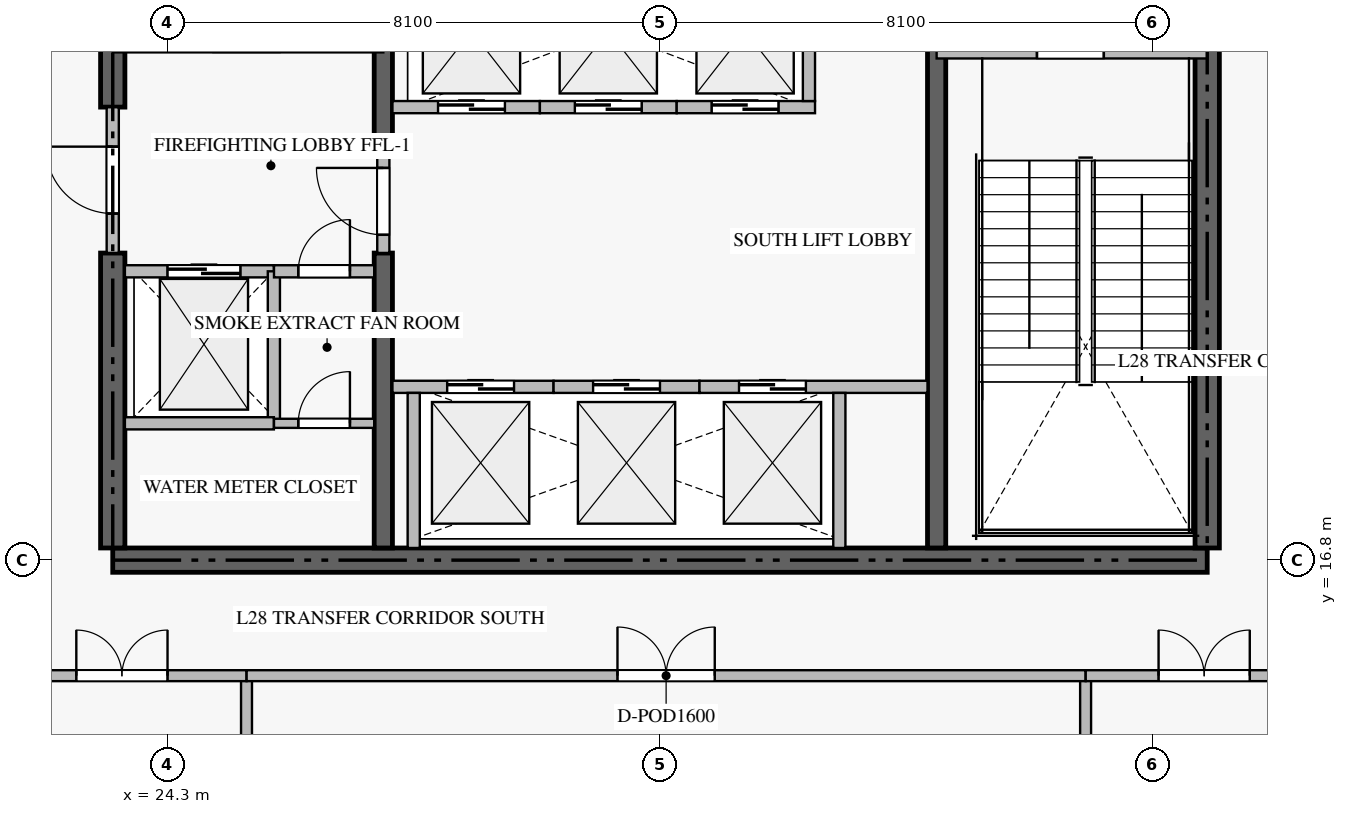
"""IFC4 building model, lengths in metres.
Left out: names, types, materials, properties, quantities, classifications, styles, units other than length and angle.
Written with IfcOpenShell. Run it as: python <this file> out.ifc"""

import sys

from ifc_helpers import new_model, si_unit, direction, frame, frame_2d, origin, place, context, subcontext, project, spatial, rectangle, extrude, source, transform, mapped, element, fill, save


model = new_model("IFC4")
c1 = context("Model", 3, precision=1e-05, world=origin(), true_north=direction((0.0, 1.0)))
c2 = subcontext(c1, "Body", "Model", "MODEL_VIEW")
j1 = project(units=[si_unit("LENGTHUNIT", "METRE"), si_unit("PLANEANGLEUNIT", "RADIAN")], contexts=[c1])
p1 = place(None, origin())
s1 = spatial("IfcSite", under=j1, at=p1, CompositionType="ELEMENT")
p2 = place(p1, origin())
s2 = spatial("IfcBuilding", under=s1, at=p2, CompositionType="ELEMENT")
p3 = place(p2, frame((0.0, 0.0, 115.2)))
s3 = spatial("IfcBuildingStorey", under=s2, at=p3, CompositionType="ELEMENT", Elevation=115.2)
p4 = place(p3, frame((23.4, 16.8, -0.36), z_axis=(0.0, 0.0, 1.0), x_axis=(1.0, 0.0, 0.0)))
e1 = element("IfcWall", 1, at=p4, inside=s3, PredefinedType="SHEAR", context=c2, shape_type="SweptSolid", body=[
    extrude(rectangle(XDim=18.0, YDim=0.4, at=frame_2d((9.0, 0.0))), origin(), (0.0, 0.0, 1.0), 4.868),
])
p5 = place(p3, frame((23.4, 17.0, -0.36), z_axis=(0.0, 0.0, 1.0), x_axis=(0.0, 1.0, 0.0)))
e2 = element("IfcWall", 2, at=p5, inside=s3, PredefinedType="SHEAR", context=c2, shape_type="SweptSolid", body=[
    extrude(rectangle(XDim=4.85, YDim=0.4, at=frame_2d((2.425, 0.0))), origin(), (0.0, 0.0, 1.0), 4.868),
])
p6 = place(p3, frame((23.4, 24.25, -0.36), z_axis=(0.0, 0.0, 1.0), x_axis=(0.0, 1.0, 0.0)))
e3 = element("IfcWall", 3, at=p6, inside=s3, PredefinedType="SHEAR", context=c2, shape_type="SweptSolid", body=[
    extrude(rectangle(XDim=9.15, YDim=0.4, at=frame_2d((4.575, 0.0))), origin(), (0.0, 0.0, 1.0), 4.868),
])
p7 = place(p3, frame((41.4, 17.0, -0.36), z_axis=(0.0, 0.0, 1.0), x_axis=(0.0, 1.0, 0.0)))
e4 = element("IfcWall", 4, at=p7, inside=s3, PredefinedType="SHEAR", context=c2, shape_type="SweptSolid", body=[
    extrude(rectangle(XDim=8.35, YDim=0.4, at=frame_2d((4.175, 0.0))), origin(), (0.0, 0.0, 1.0), 4.868),
])
p8 = place(p3, frame((27.85, 17.0, -0.36), z_axis=(0.0, 0.0, 1.0), x_axis=(0.0, 1.0, 0.0)))
e5 = element("IfcWall", 5, at=p8, inside=s3, PredefinedType="SHEAR", context=c2, shape_type="SweptSolid", body=[
    extrude(rectangle(XDim=4.85, YDim=0.3, at=frame_2d((2.425, 0.0))), origin(), (0.0, 0.0, 1.0), 4.868),
])
p9 = place(p3, frame((27.85, 23.55, -0.36), z_axis=(0.0, 0.0, 1.0), x_axis=(0.0, 1.0, 0.0)))
e6 = element("IfcWall", 6, at=p9, inside=s3, PredefinedType="SHEAR", context=c2, shape_type="SweptSolid", body=[
    extrude(rectangle(XDim=9.85, YDim=0.3, at=frame_2d((4.925, 0.0))), origin(), (0.0, 0.0, 1.0), 4.868),
])
p10 = place(p3, frame((36.95, 17.0, -0.36), z_axis=(0.0, 0.0, 1.0), x_axis=(0.0, 1.0, 0.0)))
e7 = element("IfcWall", 7, at=p10, inside=s3, PredefinedType="SHEAR", context=c2, shape_type="SweptSolid", body=[
    extrude(rectangle(XDim=8.35, YDim=0.3, at=frame_2d((4.175, 0.0))), origin(), (0.0, 0.0, 1.0), 4.868),
])
p11 = place(p3, frame((36.95, 25.15, 0.0), z_axis=(0.0, 0.0, 1.0), x_axis=(1.0, 0.0, 0.0)))
e8 = element("IfcWall", 8, at=p11, inside=s3, PredefinedType="STANDARD", context=c2, shape_type="SweptSolid", body=[
    extrude(rectangle(XDim=4.45, YDim=0.2, at=frame_2d((2.225, 0.0))), origin(), (0.0, 0.0, 1.0), 4.51),
])
p12 = place(p11, frame((1.65, 0.0, 0.0)))
e9 = element("IfcOpeningElement", 9, at=p12, cuts=e8, PredefinedType="OPENING", context=c2, shape_type="SweptSolid", body=[
    extrude(rectangle(XDim=1.1, YDim=2.15, at=frame_2d((0.55, 1.075))), frame((0.0, 0.11, 0.0), z_axis=(0.0, -1.0, 0.0), x_axis=(1.0, 0.0, 0.0)), (0.0, 0.0, 1.0), 0.22),
])
p13 = place(p3, frame((23.6, 21.55, 0.0), z_axis=(0.0, 0.0, 1.0), x_axis=(1.0, 0.0, 0.0)))
e10 = element("IfcWall", 10, at=p13, inside=s3, PredefinedType="STANDARD", context=c2, shape_type="SweptSolid", body=[
    extrude(rectangle(XDim=2.45, YDim=0.2, at=frame_2d((1.225, 0.0))), origin(), (0.0, 0.0, 1.0), 4.51),
])
p14 = place(p13, frame((0.7, 0.0, 0.0)))
e11 = element("IfcOpeningElement", 11, at=p14, cuts=e10, PredefinedType="OPENING", context=c2, shape_type="SweptSolid", body=[
    extrude(rectangle(XDim=1.2, YDim=2.2, at=frame_2d((0.6, 1.1))), frame((0.0, 0.11, 0.0), z_axis=(0.0, -1.0, 0.0), x_axis=(1.0, 0.0, 0.0)), (0.0, 0.0, 1.0), 0.22),
])
p15 = place(p3, frame((28.0, 19.65, 0.0), z_axis=(0.0, 0.0, 1.0), x_axis=(1.0, 0.0, 0.0)))
e12 = element("IfcWall", 12, at=p15, inside=s3, PredefinedType="STANDARD", context=c2, shape_type="SweptSolid", body=[
    extrude(rectangle(XDim=2.65, YDim=0.2, at=frame_2d((1.325, 0.0))), origin(), (0.0, 0.0, 1.0), 4.51),
])
p16 = place(p15, frame((0.9, 0.0, 0.0)))
e13 = element("IfcOpeningElement", 13, at=p16, cuts=e12, PredefinedType="OPENING", context=c2, shape_type="SweptSolid", body=[
    extrude(rectangle(XDim=1.1, YDim=2.2, at=frame_2d((0.55, 1.1))), frame((0.0, 0.11, 0.0), z_axis=(0.0, -1.0, 0.0), x_axis=(1.0, 0.0, 0.0)), (0.0, 0.0, 1.0), 0.22),
])
p17 = place(p3, frame((28.35, 17.0, 0.0), z_axis=(0.0, 0.0, 1.0), x_axis=(0.0, 1.0, 0.0)))
e14 = element("IfcWall", 14, at=p17, inside=s3, PredefinedType="STANDARD", context=c2, shape_type="SweptSolid", body=[
    extrude(rectangle(XDim=2.55, YDim=0.2, at=frame_2d((1.275, 0.0))), origin(), (0.0, 0.0, 1.0), 4.51),
])
p18 = place(p3, frame((30.65, 19.65, 0.0), z_axis=(0.0, 0.0, 1.0), x_axis=(1.0, 0.0, 0.0)))
e15 = element("IfcWall", 15, at=p18, inside=s3, PredefinedType="STANDARD", context=c2, shape_type="SweptSolid", body=[
    extrude(rectangle(XDim=2.4, YDim=0.2, at=frame_2d((1.2, 0.0))), origin(), (0.0, 0.0, 1.0), 4.51),
])
p19 = place(p18, frame((0.65, 0.0, 0.0)))
e16 = element("IfcOpeningElement", 16, at=p19, cuts=e15, PredefinedType="OPENING", context=c2, shape_type="SweptSolid", body=[
    extrude(rectangle(XDim=1.1, YDim=2.2, at=frame_2d((0.55, 1.1))), frame((0.0, 0.11, 0.0), z_axis=(0.0, -1.0, 0.0), x_axis=(1.0, 0.0, 0.0)), (0.0, 0.0, 1.0), 0.22),
])
p20 = place(p3, frame((33.05, 19.65, 0.0), z_axis=(0.0, 0.0, 1.0), x_axis=(1.0, 0.0, 0.0)))
e17 = element("IfcWall", 17, at=p20, inside=s3, PredefinedType="STANDARD", context=c2, shape_type="SweptSolid", body=[
    extrude(rectangle(XDim=3.75, YDim=0.2, at=frame_2d((1.875, 0.0))), origin(), (0.0, 0.0, 1.0), 4.51),
])
p21 = place(p20, frame((0.65, 0.0, 0.0)))
e18 = element("IfcOpeningElement", 18, at=p21, cuts=e17, PredefinedType="OPENING", context=c2, shape_type="SweptSolid", body=[
    extrude(rectangle(XDim=1.1, YDim=2.2, at=frame_2d((0.55, 1.1))), frame((0.0, 0.11, 0.0), z_axis=(0.0, -1.0, 0.0), x_axis=(1.0, 0.0, 0.0)), (0.0, 0.0, 1.0), 0.22),
])
p22 = place(p3, frame((35.35, 17.0, 0.0), z_axis=(0.0, 0.0, 1.0), x_axis=(0.0, 1.0, 0.0)))
e19 = element("IfcWall", 19, at=p22, inside=s3, PredefinedType="STANDARD", context=c2, shape_type="SweptSolid", body=[
    extrude(rectangle(XDim=2.55, YDim=0.2, at=frame_2d((1.275, 0.0))), origin(), (0.0, 0.0, 1.0), 4.51),
])
p23 = place(p3, frame((28.0, 24.25, 0.0), z_axis=(0.0, 0.0, 1.0), x_axis=(1.0, 0.0, 0.0)))
e20 = element("IfcWall", 20, at=p23, inside=s3, PredefinedType="STANDARD", context=c2, shape_type="SweptSolid", body=[
    extrude(rectangle(XDim=2.425, YDim=0.2, at=frame_2d((1.212, 0.0))), origin(), (0.0, 0.0, 1.0), 4.51),
])
p24 = place(p23, frame((0.75, 0.0, 0.0)))
e21 = element("IfcOpeningElement", 21, at=p24, cuts=e20, PredefinedType="OPENING", context=c2, shape_type="SweptSolid", body=[
    extrude(rectangle(XDim=1.1, YDim=2.2, at=frame_2d((0.55, 1.1))), frame((0.0, 0.11, 0.0), z_axis=(0.0, -1.0, 0.0), x_axis=(1.0, 0.0, 0.0)), (0.0, 0.0, 1.0), 0.22),
])
p25 = place(p3, frame((30.425, 24.25, 0.0), z_axis=(0.0, 0.0, 1.0), x_axis=(1.0, 0.0, 0.0)))
e22 = element("IfcWall", 22, at=p25, inside=s3, PredefinedType="STANDARD", context=c2, shape_type="SweptSolid", body=[
    extrude(rectangle(XDim=2.25, YDim=0.2, at=frame_2d((1.125, 0.0))), origin(), (0.0, 0.0, 1.0), 4.51),
])
p26 = place(p25, frame((0.575, 0.0, 0.0)))
e23 = element("IfcOpeningElement", 23, at=p26, cuts=e22, PredefinedType="OPENING", context=c2, shape_type="SweptSolid", body=[
    extrude(rectangle(XDim=1.1, YDim=2.2, at=frame_2d((0.55, 1.1))), frame((0.0, 0.11, 0.0), z_axis=(0.0, -1.0, 0.0), x_axis=(1.0, 0.0, 0.0)), (0.0, 0.0, 1.0), 0.22),
])
p27 = place(p3, frame((32.675, 24.25, 0.0), z_axis=(0.0, 0.0, 1.0), x_axis=(1.0, 0.0, 0.0)))
e24 = element("IfcWall", 24, at=p27, inside=s3, PredefinedType="STANDARD", context=c2, shape_type="SweptSolid", body=[
    extrude(rectangle(XDim=2.275, YDim=0.2, at=frame_2d((1.137, 0.0))), origin(), (0.0, 0.0, 1.0), 4.51),
])
p28 = place(p27, frame((0.575, 0.0, 0.0)))
e25 = element("IfcOpeningElement", 25, at=p28, cuts=e24, PredefinedType="OPENING", context=c2, shape_type="SweptSolid", body=[
    extrude(rectangle(XDim=1.1, YDim=2.2, at=frame_2d((0.55, 1.1))), frame((0.0, 0.11, 0.0), z_axis=(0.0, -1.0, 0.0), x_axis=(1.0, 0.0, 0.0)), (0.0, 0.0, 1.0), 0.22),
])
for number, where, z_axis, x_axis in (
    (26, (34.85, 24.35, 0.0), (0.0, 0.0, 1.0), (0.0, 1.0, 0.0)),
    (27, (26.05, 19.05, 0.0), (0.0, 0.0, 1.0), (0.0, 1.0, 0.0)),
):
    element("IfcWall", number, at=place(p3, frame(where, z_axis=z_axis, x_axis=x_axis)), inside=s3, PredefinedType="STANDARD", context=c2, shape_type="SweptSolid", body=[
        extrude(rectangle(XDim=2.5, YDim=0.2, at=frame_2d((1.25, 0.0))), origin(), (0.0, 0.0, 1.0), 4.51),
    ])
p29 = place(p3, frame((23.6, 19.05, 0.0), z_axis=(0.0, 0.0, 1.0), x_axis=(1.0, 0.0, 0.0)))
e28 = element("IfcWall", 28, at=p29, inside=s3, PredefinedType="STANDARD", context=c2, shape_type="SweptSolid", body=[
    extrude(rectangle(XDim=2.45, YDim=0.2, at=frame_2d((1.225, 0.0))), origin(), (0.0, 0.0, 1.0), 4.51),
])
p30 = place(p3, frame((26.052, 21.55, 0.0), z_axis=(0.0, 0.0, 1.0), x_axis=(1.0, 0.0, 0.0)))
e29 = element("IfcWall", 29, at=p30, inside=s3, PredefinedType="STANDARD", context=c2, shape_type="SweptSolid", body=[
    extrude(rectangle(XDim=1.648, YDim=0.2, at=frame_2d((0.824, 0.0))), origin(), (0.0, 0.0, 1.0), 4.51),
])
p31 = place(p30, frame((0.399, 0.0, 0.0)))
e30 = element("IfcOpeningElement", 30, at=p31, cuts=e29, PredefinedType="OPENING", context=c2, shape_type="SweptSolid", body=[
    extrude(rectangle(XDim=0.85, YDim=2.1, at=frame_2d((0.425, 1.05))), frame((0.0, 0.11, 0.0), z_axis=(0.0, -1.0, 0.0), x_axis=(1.0, 0.0, 0.0)), (0.0, 0.0, 1.0), 0.22),
])
p32 = place(p3, frame((23.4, 21.852, 0.0), z_axis=(0.0, 0.0, 1.0), x_axis=(0.0, 1.0, 0.0)))
e31 = element("IfcWall", 31, at=p32, inside=s3, PredefinedType="STANDARD", context=c2, shape_type="SweptSolid", body=[
    extrude(rectangle(XDim=2.396, YDim=0.2, at=frame_2d((1.198, 0.0))), origin(), (0.0, 0.0, 1.0), 4.51),
])
p33 = place(p32, frame((0.648, 0.0, 0.0)))
e32 = element("IfcOpeningElement", 32, at=p33, cuts=e31, PredefinedType="OPENING", context=c2, shape_type="SweptSolid", body=[
    extrude(rectangle(XDim=1.1, YDim=2.15, at=frame_2d((0.55, 1.075))), frame((0.0, 0.11, 0.0), z_axis=(0.0, -1.0, 0.0), x_axis=(1.0, 0.0, 0.0)), (0.0, 0.0, 1.0), 0.22),
])
p34 = place(p3, frame((27.85, 21.852, 0.0), z_axis=(0.0, 0.0, 1.0), x_axis=(0.0, 1.0, 0.0)))
e33 = element("IfcWall", 33, at=p34, inside=s3, PredefinedType="STANDARD", context=c2, shape_type="SweptSolid", body=[
    extrude(rectangle(XDim=1.696, YDim=0.2, at=frame_2d((0.848, 0.0))), origin(), (0.0, 0.0, 1.0), 4.51),
])
p35 = place(p34, frame((0.298, 0.0, 0.0)))
e34 = element("IfcOpeningElement", 34, at=p35, cuts=e33, PredefinedType="OPENING", context=c2, shape_type="SweptSolid", body=[
    extrude(rectangle(XDim=1.1, YDim=2.15, at=frame_2d((0.55, 1.075))), frame((0.0, 0.11, 0.0), z_axis=(0.0, -1.0, 0.0), x_axis=(1.0, 0.0, 0.0)), (0.0, 0.0, 1.0), 0.22),
])
p36 = place(p3, frame((26.052, 19.05, 0.0), z_axis=(0.0, 0.0, 1.0), x_axis=(1.0, 0.0, 0.0)))
e35 = element("IfcWall", 35, at=p36, inside=s3, PredefinedType="PARTITIONING", context=c2, shape_type="SweptSolid", body=[
    extrude(rectangle(XDim=1.648, YDim=0.15, at=frame_2d((0.824, 0.0))), origin(), (0.0, 0.0, 1.0), 4.51),
])
p37 = place(p36, frame((0.399, 0.0, 0.0)))
e36 = element("IfcOpeningElement", 36, at=p37, cuts=e35, PredefinedType="OPENING", context=c2, shape_type="SweptSolid", body=[
    extrude(rectangle(XDim=0.85, YDim=2.1, at=frame_2d((0.425, 1.05))), frame((0.0, 0.085, 0.0), z_axis=(0.0, -1.0, 0.0), x_axis=(1.0, 0.0, 0.0)), (0.0, 0.0, 1.0), 0.17),
])
for number, where, z_axis, x_axis in (
    (37, (25.6, 0.282, 0.0), (0.0, 0.0, 1.0), (0.0, 1.0, 0.0)),
    (38, (39.4, 0.282, 0.0), (0.0, 0.0, 1.0), (0.0, 1.0, 0.0)),
):
    element("IfcWall", number, at=place(p3, frame(where, z_axis=z_axis, x_axis=x_axis)), inside=s3, PredefinedType="PARTITIONING", context=c2, shape_type="SweptSolid", body=[
        extrude(rectangle(XDim=14.618, YDim=0.18, at=frame_2d((7.309, 0.0))), origin(), (0.0, 0.0, 1.0), 4.51),
    ])
p38 = place(p3, frame((21.502, 14.9, 0.0), z_axis=(0.0, 0.0, 1.0), x_axis=(1.0, 0.0, 0.0)))
e39 = element("IfcWall", 39, at=p38, inside=s3, PredefinedType="PARTITIONING", context=c2, shape_type="SweptSolid", body=[
    extrude(rectangle(XDim=4.098, YDim=0.18, at=frame_2d((2.049, 0.0))), origin(), (0.0, 0.0, 1.0), 4.51),
])
p39 = place(p38, frame((1.299, 0.0, 0.0)))
e40 = element("IfcOpeningElement", 40, at=p39, cuts=e39, PredefinedType="OPENING", context=c2, shape_type="SweptSolid", body=[
    extrude(rectangle(XDim=1.5, YDim=2.25, at=frame_2d((0.75, 1.125))), frame((0.0, 0.1, 0.0), z_axis=(0.0, -1.0, 0.0), x_axis=(1.0, 0.0, 0.0)), (0.0, 0.0, 1.0), 0.2),
])
p40 = place(p3, frame((25.602, 14.9, 0.0), z_axis=(0.0, 0.0, 1.0), x_axis=(1.0, 0.0, 0.0)))
e41 = element("IfcWall", 41, at=p40, inside=s3, PredefinedType="PARTITIONING", context=c2, shape_type="SweptSolid", body=[
    extrude(rectangle(XDim=13.798, YDim=0.18, at=frame_2d((6.899, 0.0))), origin(), (0.0, 0.0, 1.0), 4.51),
])
p41 = place(p40, frame((6.099, 0.0, 0.0)))
e42 = element("IfcOpeningElement", 42, at=p41, cuts=e41, PredefinedType="OPENING", context=c2, shape_type="SweptSolid", body=[
    extrude(rectangle(XDim=1.6, YDim=2.3, at=frame_2d((0.8, 1.15))), frame((0.0, 0.1, 0.0), z_axis=(0.0, -1.0, 0.0), x_axis=(1.0, 0.0, 0.0)), (0.0, 0.0, 1.0), 0.2),
])
p42 = place(p3, frame((39.402, 14.9, 0.0), z_axis=(0.0, 0.0, 1.0), x_axis=(1.0, 0.0, 0.0)))
e43 = element("IfcWall", 43, at=p42, inside=s3, PredefinedType="PARTITIONING", context=c2, shape_type="SweptSolid", body=[
    extrude(rectangle(XDim=3.896, YDim=0.18, at=frame_2d((1.948, 0.0))), origin(), (0.0, 0.0, 1.0), 4.51),
])
p43 = place(p42, frame((1.198, 0.0, 0.0)))
e44 = element("IfcOpeningElement", 44, at=p43, cuts=e43, PredefinedType="OPENING", context=c2, shape_type="SweptSolid", body=[
    extrude(rectangle(XDim=1.5, YDim=2.25, at=frame_2d((0.75, 1.125))), frame((0.0, 0.1, 0.0), z_axis=(0.0, -1.0, 0.0), x_axis=(1.0, 0.0, 0.0)), (0.0, 0.0, 1.0), 0.2),
])
m1 = source(origin(), c2, "Body", "SweptSolid", [
    extrude(rectangle(XDim=1.1, YDim=2.15, at=frame_2d((0.55, 1.075))), frame((0.0, 0.025, 0.0), z_axis=(0.0, -1.0, 0.0), x_axis=(1.0, 0.0, 0.0)), (0.0, 0.0, 1.0), 0.05),
])
p44 = place(p12, origin())
e45 = element("IfcDoor", 45, at=p44, inside=s3, OperationType="SINGLE_SWING_LEFT", PredefinedType="DOOR", context=c2, shape_type="MappedRepresentation", body=[
    mapped(m1, transform((0.0, 0.0, 0.0), scale=1.0)),
])
fill(e9, e45)
m2 = source(origin(), c2, "Body", "SweptSolid", [
    extrude(rectangle(XDim=1.2, YDim=2.2, at=frame_2d((0.6, 1.1))), frame((0.0, 0.025, 0.0), z_axis=(0.0, -1.0, 0.0), x_axis=(1.0, 0.0, 0.0)), (0.0, 0.0, 1.0), 0.05),
])
p45 = place(p14, origin())
e46 = element("IfcDoor", 46, at=p45, inside=s3, OperationType="DOUBLE_DOOR_SLIDING", PredefinedType="DOOR", context=c2, shape_type="MappedRepresentation", body=[
    mapped(m2, transform((0.0, 0.0, 0.0), scale=1.0)),
])
fill(e11, e46)
m3 = source(origin(), c2, "Body", "SweptSolid", [
    extrude(rectangle(XDim=1.1, YDim=2.2, at=frame_2d((0.55, 1.1))), frame((0.0, 0.025, 0.0), z_axis=(0.0, -1.0, 0.0), x_axis=(1.0, 0.0, 0.0)), (0.0, 0.0, 1.0), 0.05),
])
p46 = place(p16, origin())
e47 = element("IfcDoor", 47, at=p46, inside=s3, OperationType="DOUBLE_DOOR_SLIDING", PredefinedType="DOOR", context=c2, shape_type="MappedRepresentation", body=[
    mapped(m3, transform((0.0, 0.0, 0.0), scale=1.0)),
])
fill(e13, e47)
p47 = place(p19, origin())
e48 = element("IfcDoor", 48, at=p47, inside=s3, OperationType="DOUBLE_DOOR_SLIDING", PredefinedType="DOOR", context=c2, shape_type="MappedRepresentation", body=[
    mapped(m3, transform((0.0, 0.0, 0.0), scale=1.0)),
])
fill(e16, e48)
p48 = place(p21, origin())
e49 = element("IfcDoor", 49, at=p48, inside=s3, OperationType="DOUBLE_DOOR_SLIDING", PredefinedType="DOOR", context=c2, shape_type="MappedRepresentation", body=[
    mapped(m3, transform((0.0, 0.0, 0.0), scale=1.0)),
])
fill(e18, e49)
p49 = place(p24, origin())
e50 = element("IfcDoor", 50, at=p49, inside=s3, OperationType="DOUBLE_DOOR_SLIDING", PredefinedType="DOOR", context=c2, shape_type="MappedRepresentation", body=[
    mapped(m3, transform((0.0, 0.0, 0.0), scale=1.0)),
])
fill(e21, e50)
p50 = place(p26, origin())
e51 = element("IfcDoor", 51, at=p50, inside=s3, OperationType="DOUBLE_DOOR_SLIDING", PredefinedType="DOOR", context=c2, shape_type="MappedRepresentation", body=[
    mapped(m3, transform((0.0, 0.0, 0.0), scale=1.0)),
])
fill(e23, e51)
p51 = place(p28, origin())
e52 = element("IfcDoor", 52, at=p51, inside=s3, OperationType="DOUBLE_DOOR_SLIDING", PredefinedType="DOOR", context=c2, shape_type="MappedRepresentation", body=[
    mapped(m3, transform((0.0, 0.0, 0.0), scale=1.0)),
])
fill(e25, e52)
m4 = source(origin(), c2, "Body", "SweptSolid", [
    extrude(rectangle(XDim=0.85, YDim=2.1, at=frame_2d((0.425, 1.05))), frame((0.0, 0.025, 0.0), z_axis=(0.0, -1.0, 0.0), x_axis=(1.0, 0.0, 0.0)), (0.0, 0.0, 1.0), 0.05),
])
p52 = place(p31, origin())
e53 = element("IfcDoor", 53, at=p52, inside=s3, OperationType="SINGLE_SWING_RIGHT", PredefinedType="DOOR", context=c2, shape_type="MappedRepresentation", body=[
    mapped(m4, transform((0.0, 0.0, 0.0), scale=1.0)),
])
fill(e30, e53)
p53 = place(p33, origin())
e54 = element("IfcDoor", 54, at=p53, inside=s3, OperationType="SINGLE_SWING_RIGHT", PredefinedType="DOOR", context=c2, shape_type="MappedRepresentation", body=[
    mapped(m1, transform((0.0, 0.0, 0.0), scale=1.0)),
])
fill(e32, e54)
p54 = place(p35, origin())
e55 = element("IfcDoor", 55, at=p54, inside=s3, OperationType="SINGLE_SWING_RIGHT", PredefinedType="DOOR", context=c2, shape_type="MappedRepresentation", body=[
    mapped(m1, transform((0.0, 0.0, 0.0), scale=1.0)),
])
fill(e34, e55)
p55 = place(p37, origin())
e56 = element("IfcDoor", 56, at=p55, inside=s3, OperationType="SINGLE_SWING_RIGHT", PredefinedType="DOOR", context=c2, shape_type="MappedRepresentation", body=[
    mapped(m4, transform((0.0, 0.0, 0.0), scale=1.0)),
])
fill(e36, e56)
m5 = source(origin(), c2, "Body", "SweptSolid", [
    extrude(rectangle(XDim=1.5, YDim=2.25, at=frame_2d((0.75, 1.125))), frame((0.0, 0.025, 0.0), z_axis=(0.0, -1.0, 0.0), x_axis=(1.0, 0.0, 0.0)), (0.0, 0.0, 1.0), 0.05),
])
p56 = place(p39, origin())
e57 = element("IfcDoor", 57, at=p56, inside=s3, OperationType="DOUBLE_DOOR_SINGLE_SWING", PredefinedType="DOOR", context=c2, shape_type="MappedRepresentation", body=[
    mapped(m5, transform((0.0, 0.0, 0.0), scale=1.0)),
])
fill(e40, e57)
m6 = source(origin(), c2, "Body", "SweptSolid", [
    extrude(rectangle(XDim=1.6, YDim=2.3, at=frame_2d((0.8, 1.15))), frame((0.0, 0.025, 0.0), z_axis=(0.0, -1.0, 0.0), x_axis=(1.0, 0.0, 0.0)), (0.0, 0.0, 1.0), 0.05),
])
p57 = place(p41, origin())
e58 = element("IfcDoor", 58, at=p57, inside=s3, OperationType="DOUBLE_DOOR_SINGLE_SWING", PredefinedType="DOOR", context=c2, shape_type="MappedRepresentation", body=[
    mapped(m6, transform((0.0, 0.0, 0.0), scale=1.0)),
])
fill(e42, e58)
p58 = place(p43, origin())
e59 = element("IfcDoor", 59, at=p58, inside=s3, OperationType="DOUBLE_DOOR_SINGLE_SWING", PredefinedType="DOOR", context=c2, shape_type="MappedRepresentation", body=[
    mapped(m5, transform((0.0, 0.0, 0.0), scale=1.0)),
])
fill(e44, e59)
save(model, sys.argv[1])
